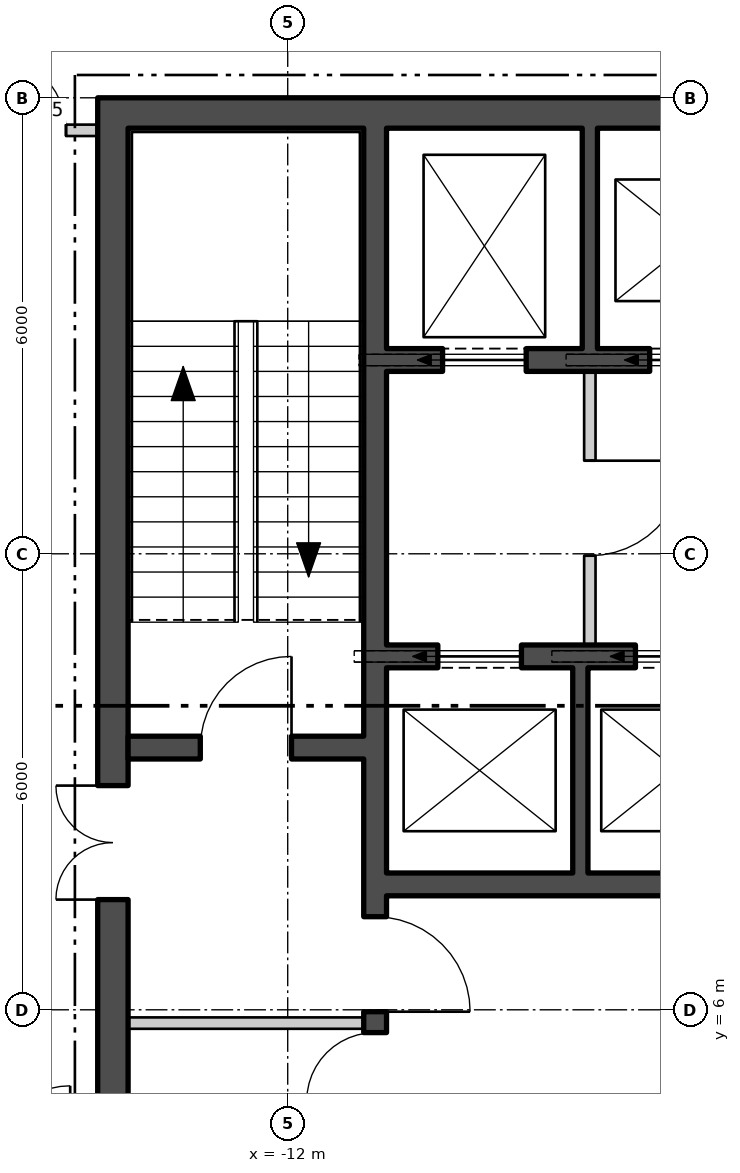
"""IFC4 building model, lengths in metres.
Left out: names, types, materials, properties, quantities, classifications, styles, units other than length and angle.
Written with IfcOpenShell. Run it as: python <this file> out.ifc"""

import sys

from ifc_helpers import new_model, si_unit, direction, frame, frame_2d, origin, place, context, subcontext, project, spatial, polyline, rectangle, outline, extrude, element, fill, save


model = new_model("IFC4")
c1 = context("Model", 3, precision=1e-05, world=origin(), true_north=direction((0.0, 1.0)))
c2 = subcontext(c1, "Body", "Model", "MODEL_VIEW")
j1 = project(units=[si_unit("LENGTHUNIT", "METRE"), si_unit("PLANEANGLEUNIT", "RADIAN")], contexts=[c1])
p1 = place(None, origin())
s1 = spatial("IfcSite", under=j1, at=p1, CompositionType="ELEMENT")
p2 = place(p1, origin())
s2 = spatial("IfcBuilding", under=s1, at=p2, CompositionType="ELEMENT")
p3 = place(p2, frame((0.0, 0.0, 257.1)))
s3 = spatial("IfcBuildingStorey", under=s2, at=p3, CompositionType="ELEMENT", Elevation=257.1)
p4 = place(p3, frame((-25.69, 15.082, -0.18), z_axis=(0.0, 0.0, 1.0), x_axis=(0.500000141277, -0.866025322218, 0.0)))
e1 = element("IfcWall", 1, at=p4, inside=s3, PredefinedType="SOLIDWALL", context=c2, shape_type="SweptSolid", body=[
    extrude(outline(polyline([(-0.13, -0.225), (45.86, -0.225), (45.6, 0.225), (0.13, 0.225), (-0.13, -0.225)])), origin(), (0.0, 0.0, 1.0), 3.68),
])
p5 = place(p4, frame((1.424, 0.0, 1.08)))
e2 = element("IfcOpeningElement", 2, at=p5, cuts=e1, PredefinedType="OPENING", context=c2, shape_type="SweptSolid", body=[
    extrude(rectangle(XDim=2.4, YDim=2.0, at=frame_2d((1.2, 1.0))), frame((0.0, 0.235, 0.0), z_axis=(0.0, -1.0, 0.0), x_axis=(1.0, 0.0, 0.0)), (0.0, 0.0, 1.0), 0.47),
])
p6 = place(p4, frame((5.892, 0.0, 1.08)))
e3 = element("IfcOpeningElement", 3, at=p6, cuts=e1, PredefinedType="OPENING", context=c2, shape_type="SweptSolid", body=[
    extrude(rectangle(XDim=2.4, YDim=2.0, at=frame_2d((1.2, 1.0))), frame((0.0, 0.235, 0.0), z_axis=(0.0, -1.0, 0.0), x_axis=(1.0, 0.0, 0.0)), (0.0, 0.0, 1.0), 0.47),
])
p7 = place(p4, frame((10.399, 0.0, 1.08)))
e4 = element("IfcOpeningElement", 4, at=p7, cuts=e1, PredefinedType="OPENING", context=c2, shape_type="SweptSolid", body=[
    extrude(rectangle(XDim=2.4, YDim=2.0, at=frame_2d((1.2, 1.0))), frame((0.0, 0.235, 0.0), z_axis=(0.0, -1.0, 0.0), x_axis=(1.0, 0.0, 0.0)), (0.0, 0.0, 1.0), 0.47),
])
p8 = place(p4, frame((14.905, 0.0, 1.08)))
e5 = element("IfcOpeningElement", 5, at=p8, cuts=e1, PredefinedType="OPENING", context=c2, shape_type="SweptSolid", body=[
    extrude(rectangle(XDim=2.4, YDim=2.0, at=frame_2d((1.2, 1.0))), frame((0.0, 0.235, 0.0), z_axis=(0.0, -1.0, 0.0), x_axis=(1.0, 0.0, 0.0)), (0.0, 0.0, 1.0), 0.47),
])
p9 = place(p4, frame((19.412, 0.0, 1.08)))
e6 = element("IfcOpeningElement", 6, at=p9, cuts=e1, PredefinedType="OPENING", context=c2, shape_type="SweptSolid", body=[
    extrude(rectangle(XDim=2.4, YDim=2.0, at=frame_2d((1.2, 1.0))), frame((0.0, 0.235, 0.0), z_axis=(0.0, -1.0, 0.0), x_axis=(1.0, 0.0, 0.0)), (0.0, 0.0, 1.0), 0.47),
])
p10 = place(p4, frame((23.918, 0.0, 1.08)))
e7 = element("IfcOpeningElement", 7, at=p10, cuts=e1, PredefinedType="OPENING", context=c2, shape_type="SweptSolid", body=[
    extrude(rectangle(XDim=2.4, YDim=2.0, at=frame_2d((1.2, 1.0))), frame((0.0, 0.235, 0.0), z_axis=(0.0, -1.0, 0.0), x_axis=(1.0, 0.0, 0.0)), (0.0, 0.0, 1.0), 0.47),
])
p11 = place(p4, frame((28.425, 0.0, 1.08)))
e8 = element("IfcOpeningElement", 8, at=p11, cuts=e1, PredefinedType="OPENING", context=c2, shape_type="SweptSolid", body=[
    extrude(rectangle(XDim=2.4, YDim=2.0, at=frame_2d((1.2, 1.0))), frame((0.0, 0.235, 0.0), z_axis=(0.0, -1.0, 0.0), x_axis=(1.0, 0.0, 0.0)), (0.0, 0.0, 1.0), 0.47),
])
p12 = place(p4, frame((32.932, 0.0, 1.08)))
e9 = element("IfcOpeningElement", 9, at=p12, cuts=e1, PredefinedType="OPENING", context=c2, shape_type="SweptSolid", body=[
    extrude(rectangle(XDim=2.4, YDim=2.0, at=frame_2d((1.2, 1.0))), frame((0.0, 0.235, 0.0), z_axis=(0.0, -1.0, 0.0), x_axis=(1.0, 0.0, 0.0)), (0.0, 0.0, 1.0), 0.47),
])
p13 = place(p4, frame((37.438, 0.0, 1.08)))
e10 = element("IfcOpeningElement", 10, at=p13, cuts=e1, PredefinedType="OPENING", context=c2, shape_type="SweptSolid", body=[
    extrude(rectangle(XDim=2.4, YDim=2.0, at=frame_2d((1.2, 1.0))), frame((0.0, 0.235, 0.0), z_axis=(0.0, -1.0, 0.0), x_axis=(1.0, 0.0, 0.0)), (0.0, 0.0, 1.0), 0.47),
])
p14 = place(p4, frame((41.907, 0.0, 1.08)))
e11 = element("IfcOpeningElement", 11, at=p14, cuts=e1, PredefinedType="OPENING", context=c2, shape_type="SweptSolid", body=[
    extrude(rectangle(XDim=2.4, YDim=2.0, at=frame_2d((1.2, 1.0))), frame((0.0, 0.235, 0.0), z_axis=(0.0, -1.0, 0.0), x_axis=(1.0, 0.0, 0.0)), (0.0, 0.0, 1.0), 0.47),
])
p15 = place(p3, frame((-14.5, 17.8, 0.0), z_axis=(0.0, 0.0, 1.0), x_axis=(1.0, 0.0, 0.0)))
e12 = element("IfcWall", 12, at=p15, inside=s3, PredefinedType="SHEAR", context=c2, shape_type="SweptSolid", body=[
    extrude(rectangle(XDim=29.0, YDim=0.4, at=frame_2d((14.5, 0.0))), origin(), (0.0, 0.0, 1.0), 3.7),
])
p16 = place(p3, frame((-14.3, 4.4, 0.0), z_axis=(0.0, 0.0, 1.0), x_axis=(0.0, 1.0, 0.0)))
e13 = element("IfcWall", 13, at=p16, inside=s3, PredefinedType="SHEAR", context=c2, shape_type="SweptSolid", body=[
    extrude(rectangle(XDim=13.2, YDim=0.4, at=frame_2d((6.6, 0.0))), origin(), (0.0, 0.0, 1.0), 3.7),
])
p17 = place(p16, frame((3.05, 0.0, 0.0)))
e14 = element("IfcOpeningElement", 14, at=p17, cuts=e13, PredefinedType="OPENING", context=c2, shape_type="SweptSolid", body=[
    extrude(rectangle(XDim=1.5, YDim=2.1, at=frame_2d((0.75, 1.05))), frame((0.0, 0.21, 0.0), z_axis=(0.0, -1.0, 0.0), x_axis=(1.0, 0.0, 0.0)), (0.0, 0.0, 1.0), 0.42),
])
p18 = place(p3, frame((-10.85, 4.4, 0.0), z_axis=(0.0, 0.0, 1.0), x_axis=(0.0, 1.0, 0.0)))
e15 = element("IfcWall", 15, at=p18, inside=s3, PredefinedType="SHEAR", context=c2, shape_type="SweptSolid", body=[
    extrude(rectangle(XDim=13.2, YDim=0.3, at=frame_2d((6.6, 0.0))), origin(), (0.0, 0.0, 1.0), 3.7),
])
p19 = place(p18, frame((1.575, 0.0, 0.0)))
e16 = element("IfcOpeningElement", 16, at=p19, cuts=e15, PredefinedType="OPENING", context=c2, shape_type="SweptSolid", body=[
    extrude(rectangle(XDim=1.25, YDim=2.1, at=frame_2d((0.625, 1.05))), frame((0.0, 0.16, 0.0), z_axis=(0.0, -1.0, 0.0), x_axis=(1.0, 0.0, 0.0)), (0.0, 0.0, 1.0), 0.32),
])
p20 = place(p18, frame((0.4, 0.0, 0.0)))
e17 = element("IfcOpeningElement", 17, at=p20, cuts=e15, PredefinedType="OPENING", context=c2, shape_type="SweptSolid", body=[
    extrude(rectangle(XDim=0.9, YDim=2.1, at=frame_2d((0.45, 1.05))), frame((0.0, 0.16, 0.0), z_axis=(0.0, -1.0, 0.0), x_axis=(1.0, 0.0, 0.0)), (0.0, 0.0, 1.0), 0.32),
])
p21 = place(p3, frame((-14.1, 9.45, 0.0), z_axis=(0.0, 0.0, 1.0), x_axis=(1.0, 0.0, 0.0)))
e18 = element("IfcWall", 18, at=p21, inside=s3, PredefinedType="SHEAR", context=c2, shape_type="SweptSolid", body=[
    extrude(rectangle(XDim=3.1, YDim=0.3, at=frame_2d((1.55, 0.0))), origin(), (0.0, 0.0, 1.0), 3.7),
])
p22 = place(p21, frame((0.95, 0.0, 0.0)))
e19 = element("IfcOpeningElement", 19, at=p22, cuts=e18, PredefinedType="OPENING", context=c2, shape_type="SweptSolid", body=[
    extrude(rectangle(XDim=1.2, YDim=2.1, at=frame_2d((0.6, 1.05))), frame((0.0, 0.16, 0.0), z_axis=(0.0, -1.0, 0.0), x_axis=(1.0, 0.0, 0.0)), (0.0, 0.0, 1.0), 0.32),
])
p23 = place(p3, frame((-10.7, 14.55, 0.0), z_axis=(0.0, 0.0, 1.0), x_axis=(1.0, 0.0, 0.0)))
e20 = element("IfcWall", 20, at=p23, inside=s3, PredefinedType="SHEAR", context=c2, shape_type="SweptSolid", body=[
    extrude(rectangle(XDim=21.4, YDim=0.3, at=frame_2d((10.7, 0.0))), origin(), (0.0, 0.0, 1.0), 3.7),
])
p24 = place(p23, frame((0.738, 0.0, 0.0)))
e21 = element("IfcOpeningElement", 21, at=p24, cuts=e20, PredefinedType="OPENING", context=c2, shape_type="SweptSolid", body=[
    extrude(rectangle(XDim=1.1, YDim=2.1, at=frame_2d((0.55, 1.05))), frame((0.0, 0.16, 0.0), z_axis=(0.0, -1.0, 0.0), x_axis=(1.0, 0.0, 0.0)), (0.0, 0.0, 1.0), 0.32),
])
p25 = place(p23, frame((3.462, 0.0, 0.0)))
e22 = element("IfcOpeningElement", 22, at=p25, cuts=e20, PredefinedType="OPENING", context=c2, shape_type="SweptSolid", body=[
    extrude(rectangle(XDim=1.1, YDim=2.1, at=frame_2d((0.55, 1.05))), frame((0.0, 0.16, 0.0), z_axis=(0.0, -1.0, 0.0), x_axis=(1.0, 0.0, 0.0)), (0.0, 0.0, 1.0), 0.32),
])
p26 = place(p23, frame((6.138, 0.0, 0.0)))
e23 = element("IfcOpeningElement", 23, at=p26, cuts=e20, PredefinedType="OPENING", context=c2, shape_type="SweptSolid", body=[
    extrude(rectangle(XDim=1.1, YDim=2.1, at=frame_2d((0.55, 1.05))), frame((0.0, 0.16, 0.0), z_axis=(0.0, -1.0, 0.0), x_axis=(1.0, 0.0, 0.0)), (0.0, 0.0, 1.0), 0.32),
])
p27 = place(p23, frame((8.812, 0.0, 0.0)))
e24 = element("IfcOpeningElement", 24, at=p27, cuts=e20, PredefinedType="OPENING", context=c2, shape_type="SweptSolid", body=[
    extrude(rectangle(XDim=1.1, YDim=2.1, at=frame_2d((0.55, 1.05))), frame((0.0, 0.16, 0.0), z_axis=(0.0, -1.0, 0.0), x_axis=(1.0, 0.0, 0.0)), (0.0, 0.0, 1.0), 0.32),
])
p28 = place(p23, frame((19.562, 0.0, 0.0)))
e25 = element("IfcOpeningElement", 25, at=p28, cuts=e20, PredefinedType="OPENING", context=c2, shape_type="SweptSolid", body=[
    extrude(rectangle(XDim=1.1, YDim=2.1, at=frame_2d((0.55, 1.05))), frame((0.0, 0.16, 0.0), z_axis=(0.0, -1.0, 0.0), x_axis=(1.0, 0.0, 0.0)), (0.0, 0.0, 1.0), 0.32),
])
p29 = place(p23, frame((11.537, 0.0, 0.0)))
e26 = element("IfcOpeningElement", 26, at=p29, cuts=e20, PredefinedType="OPENING", context=c2, shape_type="SweptSolid", body=[
    extrude(rectangle(XDim=1.0, YDim=2.1, at=frame_2d((0.5, 1.05))), frame((0.0, 0.16, 0.0), z_axis=(0.0, -1.0, 0.0), x_axis=(1.0, 0.0, 0.0)), (0.0, 0.0, 1.0), 0.32),
])
p30 = place(p23, frame((15.55, 0.0, 0.0)))
e27 = element("IfcOpeningElement", 27, at=p30, cuts=e20, PredefinedType="OPENING", context=c2, shape_type="SweptSolid", body=[
    extrude(rectangle(XDim=1.0, YDim=2.1, at=frame_2d((0.5, 1.05))), frame((0.0, 0.16, 0.0), z_axis=(0.0, -1.0, 0.0), x_axis=(1.0, 0.0, 0.0)), (0.0, 0.0, 1.0), 0.32),
])
p31 = place(p3, frame((-10.7, 10.65, 0.0), z_axis=(0.0, 0.0, 1.0), x_axis=(1.0, 0.0, 0.0)))
e28 = element("IfcWall", 28, at=p31, inside=s3, PredefinedType="SHEAR", context=c2, shape_type="SweptSolid", body=[
    extrude(rectangle(XDim=10.3, YDim=0.3, at=frame_2d((5.15, 0.0))), origin(), (0.0, 0.0, 1.0), 3.7),
])
p32 = place(p31, frame((0.675, 0.0, 0.0)))
e29 = element("IfcOpeningElement", 29, at=p32, cuts=e28, PredefinedType="OPENING", context=c2, shape_type="SweptSolid", body=[
    extrude(rectangle(XDim=1.1, YDim=2.1, at=frame_2d((0.55, 1.05))), frame((0.0, 0.16, 0.0), z_axis=(0.0, -1.0, 0.0), x_axis=(1.0, 0.0, 0.0)), (0.0, 0.0, 1.0), 0.32),
])
p33 = place(p31, frame((3.275, 0.0, 0.0)))
e30 = element("IfcOpeningElement", 30, at=p33, cuts=e28, PredefinedType="OPENING", context=c2, shape_type="SweptSolid", body=[
    extrude(rectangle(XDim=1.1, YDim=2.1, at=frame_2d((0.55, 1.05))), frame((0.0, 0.16, 0.0), z_axis=(0.0, -1.0, 0.0), x_axis=(1.0, 0.0, 0.0)), (0.0, 0.0, 1.0), 0.32),
])
p34 = place(p31, frame((5.825, 0.0, 0.0)))
e31 = element("IfcOpeningElement", 31, at=p34, cuts=e28, PredefinedType="OPENING", context=c2, shape_type="SweptSolid", body=[
    extrude(rectangle(XDim=1.1, YDim=2.1, at=frame_2d((0.55, 1.05))), frame((0.0, 0.16, 0.0), z_axis=(0.0, -1.0, 0.0), x_axis=(1.0, 0.0, 0.0)), (0.0, 0.0, 1.0), 0.32),
])
p35 = place(p31, frame((8.425, 0.0, 0.0)))
e32 = element("IfcOpeningElement", 32, at=p35, cuts=e28, PredefinedType="OPENING", context=c2, shape_type="SweptSolid", body=[
    extrude(rectangle(XDim=1.0, YDim=2.1, at=frame_2d((0.5, 1.05))), frame((0.0, 0.16, 0.0), z_axis=(0.0, -1.0, 0.0), x_axis=(1.0, 0.0, 0.0)), (0.0, 0.0, 1.0), 0.32),
])
p36 = place(p3, frame((-10.7, 7.65, 0.0), z_axis=(0.0, 0.0, 1.0), x_axis=(1.0, 0.0, 0.0)))
e33 = element("IfcWall", 33, at=p36, inside=s3, PredefinedType="SHEAR", context=c2, shape_type="SweptSolid", body=[
    extrude(rectangle(XDim=10.3, YDim=0.3, at=frame_2d((5.15, 0.0))), origin(), (0.0, 0.0, 1.0), 3.7),
])
p37 = place(p3, frame((-8.025, 14.7, 0.0), z_axis=(0.0, 0.0, 1.0), x_axis=(0.0, 1.0, 0.0)))
e34 = element("IfcWall", 34, at=p37, inside=s3, PredefinedType="SHEAR", context=c2, shape_type="SweptSolid", body=[
    extrude(rectangle(XDim=2.9, YDim=0.2, at=frame_2d((1.45, 0.0))), origin(), (0.0, 0.0, 1.0), 3.7),
])
p38 = place(p3, frame((-8.15, 7.8, 0.0), z_axis=(0.0, 0.0, 1.0), x_axis=(0.0, 1.0, 0.0)))
e35 = element("IfcWall", 35, at=p38, inside=s3, PredefinedType="SHEAR", context=c2, shape_type="SweptSolid", body=[
    extrude(rectangle(XDim=2.7, YDim=0.2, at=frame_2d((1.35, 0.0))), origin(), (0.0, 0.0, 1.0), 3.7),
])
p39 = place(p3, frame((-8.025, 10.8, 0.0), z_axis=(0.0, 0.0, 1.0), x_axis=(0.0, 1.0, 0.0)))
e36 = element("IfcWall", 36, at=p39, inside=s3, PredefinedType="PARTITIONING", context=c2, shape_type="SweptSolid", body=[
    extrude(rectangle(XDim=3.6, YDim=0.15, at=frame_2d((1.8, 0.0))), origin(), (0.0, 0.0, 1.0), 3.7),
])
p40 = place(p39, frame((1.175, 0.0, 0.0)))
e37 = element("IfcOpeningElement", 37, at=p40, cuts=e36, PredefinedType="OPENING", context=c2, shape_type="SweptSolid", body=[
    extrude(rectangle(XDim=1.25, YDim=2.1, at=frame_2d((0.625, 1.05))), frame((0.0, 0.085, 0.0), z_axis=(0.0, -1.0, 0.0), x_axis=(1.0, 0.0, 0.0)), (0.0, 0.0, 1.0), 0.17),
])
p41 = place(p3, frame((-14.1, 5.825, 0.0), z_axis=(0.0, 0.0, 1.0), x_axis=(1.0, 0.0, 0.0)))
e38 = element("IfcWall", 38, at=p41, inside=s3, PredefinedType="PARTITIONING", context=c2, shape_type="SweptSolid", body=[
    extrude(rectangle(XDim=3.1, YDim=0.15, at=frame_2d((1.55, 0.0))), origin(), (0.0, 0.0, 1.0), 3.7),
])
p42 = place(p3, frame((-16.225, 17.572, 0.0), z_axis=(0.0, 0.0, 1.0), x_axis=(1.0, 0.0, 0.0)))
e39 = element("IfcWall", 39, at=p42, inside=s3, PredefinedType="PARTITIONING", context=c2, shape_type="SweptSolid", body=[
    extrude(rectangle(XDim=1.725, YDim=0.15, at=frame_2d((0.863, 0.0))), origin(), (0.0, 0.0, 1.0), 3.7),
])
p43 = place(p42, frame((0.308, 0.0, 0.0)))
e40 = element("IfcOpeningElement", 40, at=p43, cuts=e39, PredefinedType="OPENING", context=c2, shape_type="SweptSolid", body=[
    extrude(rectangle(XDim=1.0, YDim=2.1, at=frame_2d((0.5, 1.05))), frame((0.0, 0.085, 0.0), z_axis=(0.0, -1.0, 0.0), x_axis=(1.0, 0.0, 0.0)), (0.0, 0.0, 1.0), 0.17),
])
p44 = place(p24, origin())
e41 = element("IfcDoor", 41, at=p44, inside=s3, OperationType="SLIDING_TO_LEFT", PredefinedType="DOOR", context=c2, shape_type="SweptSolid", body=[
    extrude(rectangle(XDim=1.1, YDim=2.1, at=frame_2d((0.55, 1.05))), frame((0.0, 0.025, 0.0), z_axis=(0.0, -1.0, 0.0), x_axis=(1.0, 0.0, 0.0)), (0.0, 0.0, 1.0), 0.05),
])
fill(e21, e41)
p45 = place(p25, origin())
e42 = element("IfcDoor", 42, at=p45, inside=s3, OperationType="SLIDING_TO_LEFT", PredefinedType="DOOR", context=c2, shape_type="SweptSolid", body=[
    extrude(rectangle(XDim=1.1, YDim=2.1, at=frame_2d((0.55, 1.05))), frame((0.0, 0.025, 0.0), z_axis=(0.0, -1.0, 0.0), x_axis=(1.0, 0.0, 0.0)), (0.0, 0.0, 1.0), 0.05),
])
fill(e22, e42)
p46 = place(p32, origin())
e43 = element("IfcDoor", 43, at=p46, inside=s3, OperationType="SLIDING_TO_LEFT", PredefinedType="DOOR", context=c2, shape_type="SweptSolid", body=[
    extrude(rectangle(XDim=1.1, YDim=2.1, at=frame_2d((0.55, 1.05))), frame((0.0, 0.025, 0.0), z_axis=(0.0, -1.0, 0.0), x_axis=(1.0, 0.0, 0.0)), (0.0, 0.0, 1.0), 0.05),
])
fill(e29, e43)
p47 = place(p33, origin())
e44 = element("IfcDoor", 44, at=p47, inside=s3, OperationType="SLIDING_TO_LEFT", PredefinedType="DOOR", context=c2, shape_type="SweptSolid", body=[
    extrude(rectangle(XDim=1.1, YDim=2.1, at=frame_2d((0.55, 1.05))), frame((0.0, 0.025, 0.0), z_axis=(0.0, -1.0, 0.0), x_axis=(1.0, 0.0, 0.0)), (0.0, 0.0, 1.0), 0.05),
])
fill(e30, e44)
p48 = place(p40, origin())
e45 = element("IfcDoor", 45, at=p48, inside=s3, OperationType="SINGLE_SWING_RIGHT", PredefinedType="DOOR", context=c2, shape_type="SweptSolid", body=[
    extrude(rectangle(XDim=1.25, YDim=2.1, at=frame_2d((0.625, 1.05))), frame((0.0, 0.025, 0.0), z_axis=(0.0, -1.0, 0.0), x_axis=(1.0, 0.0, 0.0)), (0.0, 0.0, 1.0), 0.05),
])
fill(e37, e45)
p49 = place(p22, origin())
e46 = element("IfcDoor", 46, at=p49, inside=s3, OperationType="SINGLE_SWING_LEFT", PredefinedType="DOOR", context=c2, shape_type="SweptSolid", body=[
    extrude(rectangle(XDim=1.2, YDim=2.1, at=frame_2d((0.6, 1.05))), frame((0.0, 0.025, 0.0), z_axis=(0.0, -1.0, 0.0), x_axis=(1.0, 0.0, 0.0)), (0.0, 0.0, 1.0), 0.05),
])
fill(e19, e46)
p50 = place(p19, origin())
e47 = element("IfcDoor", 47, at=p50, inside=s3, OperationType="SINGLE_SWING_LEFT", PredefinedType="DOOR", context=c2, shape_type="SweptSolid", body=[
    extrude(rectangle(XDim=1.25, YDim=2.1, at=frame_2d((0.625, 1.05))), frame((0.0, 0.025, 0.0), z_axis=(0.0, -1.0, 0.0), x_axis=(1.0, 0.0, 0.0)), (0.0, 0.0, 1.0), 0.05),
])
fill(e16, e47)
p51 = place(p17, origin())
e48 = element("IfcDoor", 48, at=p51, inside=s3, OperationType="DOUBLE_DOOR_SINGLE_SWING", PredefinedType="DOOR", context=c2, shape_type="SweptSolid", body=[
    extrude(rectangle(XDim=1.5, YDim=2.1, at=frame_2d((0.75, 1.05))), frame((0.0, 0.025, 0.0), z_axis=(0.0, -1.0, 0.0), x_axis=(1.0, 0.0, 0.0)), (0.0, 0.0, 1.0), 0.05),
])
fill(e14, e48)
p52 = place(p20, origin())
e49 = element("IfcDoor", 49, at=p52, inside=s3, OperationType="SINGLE_SWING_RIGHT", PredefinedType="DOOR", context=c2, shape_type="SweptSolid", body=[
    extrude(rectangle(XDim=0.9, YDim=2.1, at=frame_2d((0.45, 1.05))), frame((0.0, 0.025, 0.0), z_axis=(0.0, -1.0, 0.0), x_axis=(1.0, 0.0, 0.0)), (0.0, 0.0, 1.0), 0.05),
])
fill(e17, e49)
p53 = place(p43, origin())
e50 = element("IfcDoor", 50, at=p53, inside=s3, OperationType="SINGLE_SWING_RIGHT", PredefinedType="DOOR", context=c2, shape_type="SweptSolid", body=[
    extrude(rectangle(XDim=1.0, YDim=2.1, at=frame_2d((0.5, 1.05))), frame((0.0, 0.025, 0.0), z_axis=(0.0, -1.0, 0.0), x_axis=(1.0, 0.0, 0.0)), (0.0, 0.0, 1.0), 0.05),
])
fill(e40, e50)
save(model, sys.argv[1])
